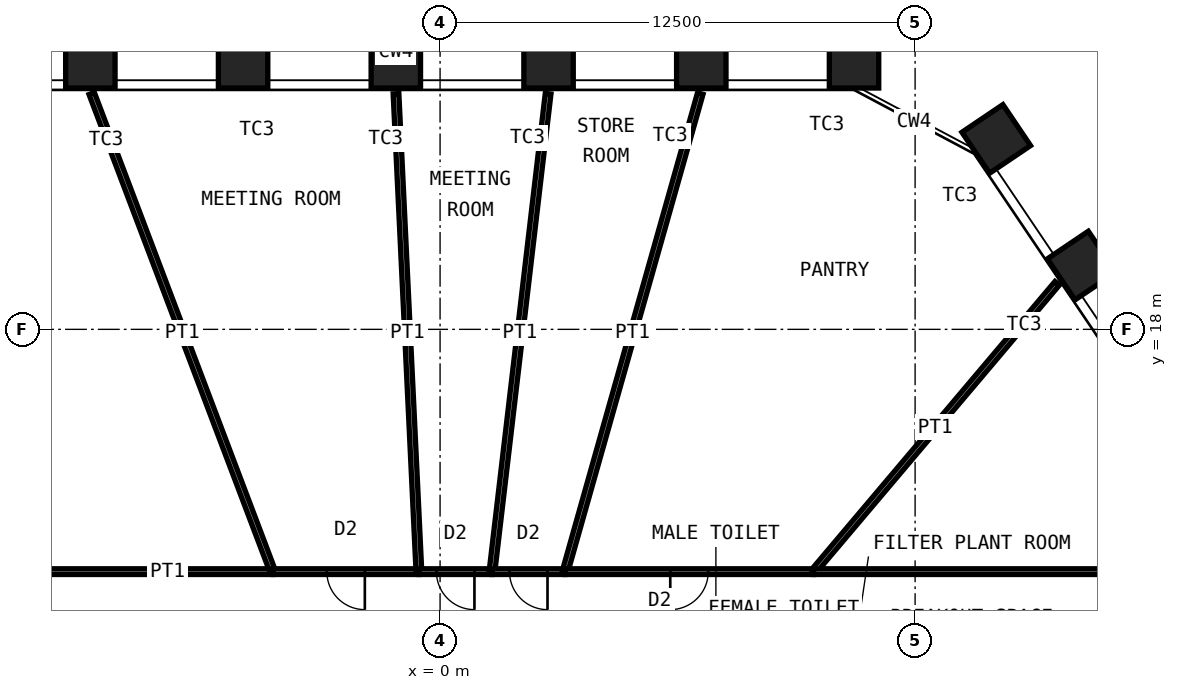
"""IFC4 building model, lengths in metres.
Left out: names, types, materials, properties, quantities, classifications, styles, units other than length and angle.
Written with IfcOpenShell. Run it as: python <this file> out.ifc"""

import sys

from ifc_helpers import new_model, si_unit, direction, frame, frame_2d, origin, origin_2d, place, context, subcontext, project, spatial, rectangle, hollow_rectangle, extrude, element, fill, save


model = new_model("IFC4")
c1 = context("Model", 3, precision=1e-05, world=origin(), true_north=direction((0.0, 1.0)))
c2 = subcontext(c1, "Body", "Model", "MODEL_VIEW")
j1 = project(units=[si_unit("LENGTHUNIT", "METRE"), si_unit("PLANEANGLEUNIT", "RADIAN")], contexts=[c1])
p1 = place(None, origin())
s1 = spatial("IfcSite", under=j1, at=p1, CompositionType="ELEMENT")
p2 = place(p1, origin())
s2 = spatial("IfcBuilding", under=s1, at=p2, CompositionType="ELEMENT")
p3 = place(p2, frame((0.0, 0.0, 107.2)))
s3 = spatial("IfcBuildingStorey", under=s2, at=p3, CompositionType="ELEMENT", Elevation=107.2)
for number, where, z_axis, x_axis in (
    (1, (-9.203, 25.0, 0.0), (0.0, 0.0, 1.0), (-1.0, 0.0, 0.0)),
    (2, (-5.184, 25.0, 0.0), (0.0, 0.0, 1.0), (-1.0, 0.0, 0.0)),
    (3, (-1.165, 25.0, 0.0), (0.0, 0.0, 1.0), (-1.0, 0.0, 0.0)),
    (4, (2.854, 25.0, 0.0), (0.0, 0.0, 1.0), (-1.0, 0.0, 0.0)),
    (5, (6.874, 25.0, 0.0), (0.0, 0.0, 1.0), (-1.0, 0.0, 0.0)),
    (6, (10.893, 25.0, 0.0), (0.0, 0.0, 1.0), (-1.0, 0.0, 0.0)),
    (7, (14.635, 23.01, 0.0), (0.0, 0.0, 1.0), (-0.559, 0.829, 0.0)),
    (8, (16.882, 19.678, 0.0), (0.0, 0.0, 1.0), (-0.559, 0.829, 0.0)),
):
    element("IfcColumn", number, at=place(p3, frame(where, z_axis=z_axis, x_axis=x_axis)), inside=s3, PredefinedType="COLUMN", context=c2, shape_type="SweptSolid", body=[
        extrude(hollow_rectangle(XDim=1.3, YDim=1.3, WallThickness=0.1, at=origin_2d()), origin(), (0.0, 0.0, 1.0), 4.2),
    ])
p4 = place(p3, frame((-18.225, 11.625, 0.0), z_axis=(0.0, 0.0, 1.0), x_axis=(1.0, 0.0, 0.0)))
e9 = element("IfcWall", 9, at=p4, inside=s3, PredefinedType="PARTITIONING", context=c2, shape_type="SweptSolid", body=[
    extrude(rectangle(XDim=13.823, YDim=0.15, at=frame_2d((6.911, 0.0))), origin(), (0.0, 0.0, 1.0), 4.03),
])
p5 = place(p4, frame((6.011, 0.0, 0.0)))
e10 = element("IfcOpeningElement", 10, at=p5, cuts=e9, PredefinedType="OPENING", context=c2, shape_type="SweptSolid", body=[
    extrude(rectangle(XDim=1.8, YDim=2.4, at=frame_2d((0.9, 1.2))), frame((0.0, 0.085, 0.0), z_axis=(0.0, -1.0, 0.0), x_axis=(1.0, 0.0, 0.0)), (0.0, 0.0, 1.0), 0.17),
])
p6 = place(p3, frame((-9.167, 24.207, 0.0), z_axis=(0.0, 0.0, 1.0), x_axis=(0.354156368181, -0.935186220427, 0.0)))
e11 = element("IfcWall", 11, at=p6, inside=s3, PredefinedType="PARTITIONING", context=c2, shape_type="SweptSolid", body=[
    extrude(rectangle(XDim=13.454, YDim=0.15, at=frame_2d((6.727, 0.0))), origin(), (0.0, 0.0, 1.0), 3.33),
])
p7 = place(p3, frame((-4.403, 11.625, 0.0), z_axis=(0.0, 0.0, 1.0), x_axis=(1.0, 0.0, 0.0)))
e12 = element("IfcWall", 12, at=p7, inside=s3, PredefinedType="PARTITIONING", context=c2, shape_type="SweptSolid", body=[
    extrude(rectangle(XDim=3.845, YDim=0.15, at=frame_2d((1.923, 0.0))), origin(), (0.0, 0.0, 1.0), 4.03),
])
p8 = place(p7, frame((1.423, 0.0, 0.0)))
e13 = element("IfcOpeningElement", 13, at=p8, cuts=e12, PredefinedType="OPENING", context=c2, shape_type="SweptSolid", body=[
    extrude(rectangle(XDim=1.0, YDim=2.4, at=frame_2d((0.5, 1.2))), frame((0.0, 0.085, 0.0), z_axis=(0.0, -1.0, 0.0), x_axis=(1.0, 0.0, 0.0)), (0.0, 0.0, 1.0), 0.17),
])
p9 = place(p3, frame((-1.16, 24.2, 0.0), z_axis=(0.0, 0.0, 1.0), x_axis=(0.047859979164, -0.998854054602, 0.0)))
e14 = element("IfcWall", 14, at=p9, inside=s3, PredefinedType="PARTITIONING", context=c2, shape_type="SweptSolid", body=[
    extrude(rectangle(XDim=12.59, YDim=0.15, at=frame_2d((6.295, 0.0))), origin(), (0.0, 0.0, 1.0), 3.33),
])
p10 = place(p3, frame((-0.557, 11.625, 0.0), z_axis=(0.0, 0.0, 1.0), x_axis=(1.0, 0.0, 0.0)))
e15 = element("IfcWall", 15, at=p10, inside=s3, PredefinedType="PARTITIONING", context=c2, shape_type="SweptSolid", body=[
    extrude(rectangle(XDim=1.923, YDim=0.15, at=frame_2d((0.961, 0.0))), origin(), (0.0, 0.0, 1.0), 4.03),
])
p11 = place(p10, frame((0.461, 0.0, 0.0)))
e16 = element("IfcOpeningElement", 16, at=p11, cuts=e15, PredefinedType="OPENING", context=c2, shape_type="SweptSolid", body=[
    extrude(rectangle(XDim=1.0, YDim=2.4, at=frame_2d((0.5, 1.2))), frame((0.0, 0.085, 0.0), z_axis=(0.0, -1.0, 0.0), x_axis=(1.0, 0.0, 0.0)), (0.0, 0.0, 1.0), 0.17),
])
p12 = place(p3, frame((2.843, 24.201, 0.0), z_axis=(0.0, 0.0, 1.0), x_axis=(-0.116670084723, -0.993170726175, 0.0)))
e17 = element("IfcWall", 17, at=p12, inside=s3, PredefinedType="PARTITIONING", context=c2, shape_type="SweptSolid", body=[
    extrude(rectangle(XDim=12.662, YDim=0.15, at=frame_2d((6.331, 0.0))), origin(), (0.0, 0.0, 1.0), 3.33),
])
p13 = place(p3, frame((1.366, 11.625, 0.0), z_axis=(0.0, 0.0, 1.0), x_axis=(1.0, 0.0, 0.0)))
e18 = element("IfcWall", 18, at=p13, inside=s3, PredefinedType="PARTITIONING", context=c2, shape_type="SweptSolid", body=[
    extrude(rectangle(XDim=1.923, YDim=0.15, at=frame_2d((0.961, 0.0))), origin(), (0.0, 0.0, 1.0), 4.03),
])
p14 = place(p13, frame((0.461, 0.0, 0.0)))
e19 = element("IfcOpeningElement", 19, at=p14, cuts=e18, PredefinedType="OPENING", context=c2, shape_type="SweptSolid", body=[
    extrude(rectangle(XDim=1.0, YDim=2.4, at=frame_2d((0.5, 1.2))), frame((0.0, 0.085, 0.0), z_axis=(0.0, -1.0, 0.0), x_axis=(1.0, 0.0, 0.0)), (0.0, 0.0, 1.0), 0.17),
])
p15 = place(p3, frame((6.846, 24.204, 0.0), z_axis=(0.0, 0.0, 1.0), x_axis=(-0.272184461049, -0.962245093084, 0.0)))
e20 = element("IfcWall", 20, at=p15, inside=s3, PredefinedType="PARTITIONING", context=c2, shape_type="SweptSolid", body=[
    extrude(rectangle(XDim=13.073, YDim=0.15, at=frame_2d((6.536, 0.0))), origin(), (0.0, 0.0, 1.0), 3.33),
])
p16 = place(p3, frame((3.288, 11.625, 0.0), z_axis=(0.0, 0.0, 1.0), x_axis=(1.0, 0.0, 0.0)))
e21 = element("IfcWall", 21, at=p16, inside=s3, PredefinedType="PARTITIONING", context=c2, shape_type="SweptSolid", body=[
    extrude(rectangle(XDim=6.538, YDim=0.15, at=frame_2d((3.269, 0.0))), origin(), (0.0, 0.0, 1.0), 4.03),
])
p17 = place(p16, frame((2.769, 0.0, 0.0)))
e22 = element("IfcOpeningElement", 22, at=p17, cuts=e21, PredefinedType="OPENING", context=c2, shape_type="SweptSolid", body=[
    extrude(rectangle(XDim=1.0, YDim=2.4, at=frame_2d((0.5, 1.2))), frame((0.0, 0.085, 0.0), z_axis=(0.0, -1.0, 0.0), x_axis=(1.0, 0.0, 0.0)), (0.0, 0.0, 1.0), 0.17),
])
p18 = place(p3, frame((16.237, 19.21, 0.0), z_axis=(0.0, 0.0, 1.0), x_axis=(-0.645526723652, -0.763737683404, 0.0)))
e23 = element("IfcWall", 23, at=p18, inside=s3, PredefinedType="PARTITIONING", context=c2, shape_type="SweptSolid", body=[
    extrude(rectangle(XDim=9.932, YDim=0.15, at=frame_2d((4.966, 0.0))), origin(), (0.0, 0.0, 1.0), 3.33),
])
p19 = place(p3, frame((9.826, 11.625, 0.0), z_axis=(0.0, 0.0, 1.0), x_axis=(1.0, 0.0, 0.0)))
e24 = element("IfcWall", 24, at=p19, inside=s3, PredefinedType="PARTITIONING", context=c2, shape_type="SweptSolid", body=[
    extrude(rectangle(XDim=7.799, YDim=0.15, at=frame_2d((3.899, 0.0))), origin(), (0.0, 0.0, 1.0), 4.03),
])
p20 = place(p8, origin())
e25 = element("IfcDoor", 25, at=p20, inside=s3, OperationType="SINGLE_SWING_RIGHT", PredefinedType="DOOR", context=c2, shape_type="SweptSolid", body=[
    extrude(rectangle(XDim=1.0, YDim=2.4, at=frame_2d((0.5, 1.2))), frame((0.0, 0.025, 0.0), z_axis=(0.0, -1.0, 0.0), x_axis=(1.0, 0.0, 0.0)), (0.0, 0.0, 1.0), 0.05),
])
fill(e13, e25)
p21 = place(p11, origin())
e26 = element("IfcDoor", 26, at=p21, inside=s3, OperationType="SINGLE_SWING_RIGHT", PredefinedType="DOOR", context=c2, shape_type="SweptSolid", body=[
    extrude(rectangle(XDim=1.0, YDim=2.4, at=frame_2d((0.5, 1.2))), frame((0.0, 0.025, 0.0), z_axis=(0.0, -1.0, 0.0), x_axis=(1.0, 0.0, 0.0)), (0.0, 0.0, 1.0), 0.05),
])
fill(e16, e26)
p22 = place(p14, origin())
e27 = element("IfcDoor", 27, at=p22, inside=s3, OperationType="SINGLE_SWING_RIGHT", PredefinedType="DOOR", context=c2, shape_type="SweptSolid", body=[
    extrude(rectangle(XDim=1.0, YDim=2.4, at=frame_2d((0.5, 1.2))), frame((0.0, 0.025, 0.0), z_axis=(0.0, -1.0, 0.0), x_axis=(1.0, 0.0, 0.0)), (0.0, 0.0, 1.0), 0.05),
])
fill(e19, e27)
p23 = place(p17, origin())
e28 = element("IfcDoor", 28, at=p23, inside=s3, OperationType="SINGLE_SWING_LEFT", PredefinedType="DOOR", context=c2, shape_type="SweptSolid", body=[
    extrude(rectangle(XDim=1.0, YDim=2.4, at=frame_2d((0.5, 1.2))), frame((0.0, 0.025, 0.0), z_axis=(0.0, -1.0, 0.0), x_axis=(1.0, 0.0, 0.0)), (0.0, 0.0, 1.0), 0.05),
])
fill(e22, e28)
save(model, sys.argv[1])
